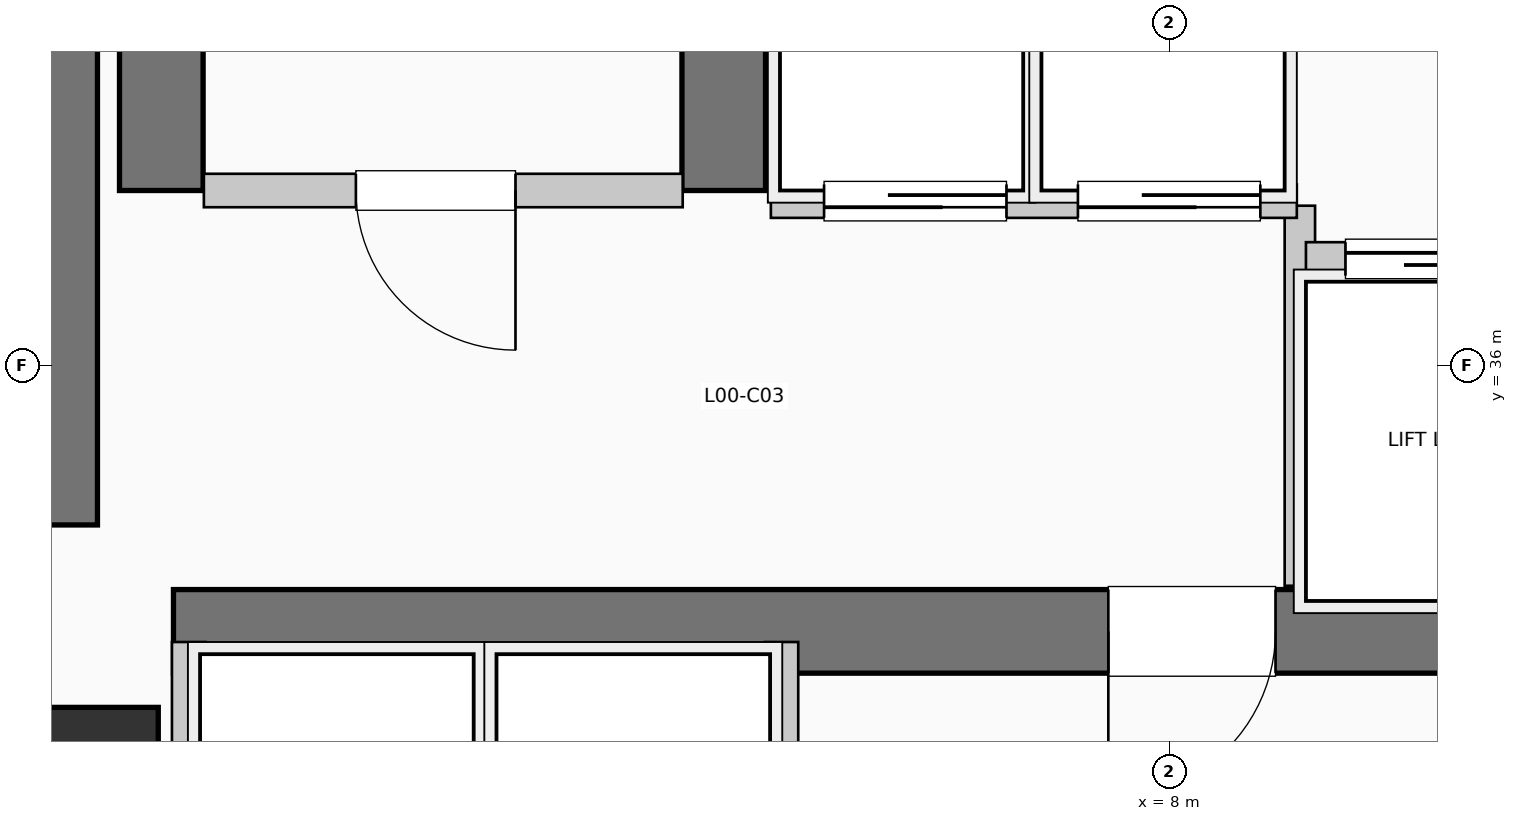
"""IFC4 building model, lengths in metres.
Left out: names, types, materials, properties, quantities, classifications, styles, units other than length and angle.
Written with IfcOpenShell. Run it as: python <this file> out.ifc"""

import sys

from ifc_helpers import new_model, si_unit, direction, frame, frame_2d, origin, origin_2d, place, context, subcontext, project, spatial, rectangle, extrude, element, fill, save


model = new_model("IFC4")
c1 = context("Model", 3, precision=1e-05, world=origin(), true_north=direction((0.0, 1.0)))
c2 = subcontext(c1, "Body", "Model", "MODEL_VIEW")
j1 = project(units=[si_unit("LENGTHUNIT", "METRE"), si_unit("PLANEANGLEUNIT", "RADIAN")], contexts=[c1])
p1 = place(None, origin())
s1 = spatial("IfcSite", under=j1, at=p1, CompositionType="ELEMENT")
p2 = place(p1, origin())
s2 = spatial("IfcBuilding", under=s1, at=p2, CompositionType="ELEMENT")
p3 = place(p2, origin())
s3 = spatial("IfcBuildingStorey", under=s2, at=p3, CompositionType="ELEMENT", Elevation=0.0)
p4 = place(p3, frame((0.5, 34.95, 0.0), z_axis=(0.0, 0.0, 1.0), x_axis=(0.0, 1.0, 0.0)))
e1 = element("IfcWall", 1, at=p4, inside=s3, PredefinedType="SHEAR", context=c2, shape_type="SweptSolid", body=[
    extrude(rectangle(XDim=7.9, YDim=0.9, at=frame_2d((3.95, 0.0))), origin(), (0.0, 0.0, 1.0), 5.94),
])
p5 = place(p3, frame((1.45, 34.25, 0.0), z_axis=(0.0, 0.0, 1.0), x_axis=(1.0, 0.0, 0.0)))
e2 = element("IfcWall", 2, at=p5, inside=s3, PredefinedType="SHEAR", context=c2, shape_type="SweptSolid", body=[
    extrude(rectangle(XDim=10.71, YDim=0.55, at=frame_2d((5.355, 0.0))), origin(), (0.0, 0.0, 1.0), 5.94),
])
p6 = place(p5, frame((7.25, 0.0, 0.0), z_axis=(0.0, 0.0, 1.0), x_axis=(-1.0, 0.0, 0.0)))
e3 = element("IfcOpeningElement", 3, at=p6, cuts=e2, PredefinedType="OPENING", context=c2, shape_type="SweptSolid", body=[
    extrude(rectangle(XDim=1.1, YDim=2.15, at=frame_2d((0.55, 1.075))), frame((0.0, 0.285, 0.0), z_axis=(0.0, -1.0, 0.0), x_axis=(1.0, 0.0, 0.0)), (0.0, 0.0, 1.0), 0.57),
])
for number, where, z_axis, x_axis in (
    (4, (1.37, 37.15, 0.0), (0.0, 0.0, 1.0), (0.0, 1.0, 0.0)),
    (5, (5.07, 37.15, 0.0), (0.0, 0.0, 1.0), (0.0, 1.0, 0.0)),
):
    element("IfcWall", number, at=place(p3, frame(where, z_axis=z_axis, x_axis=x_axis)), inside=s3, PredefinedType="SHEAR", context=c2, shape_type="SweptSolid", body=[
        extrude(rectangle(XDim=7.89, YDim=0.55, at=frame_2d((3.945, 0.0))), origin(), (0.0, 0.0, 1.0), 5.94),
    ])
p7 = place(p3, frame((0.8, 33.2, 0.0), z_axis=(0.0, 0.0, 1.0), x_axis=(1.0, 0.0, 0.0)))
e6 = element("IfcColumn", 6, at=p7, inside=s3, PredefinedType="COLUMN", context=c2, shape_type="SweptSolid", body=[
    extrude(rectangle(XDim=1.1, YDim=1.1, at=origin_2d()), origin(), (0.0, 0.0, 1.0), 5.94),
])
p8 = place(p3, frame((1.65, 37.15, 0.0), z_axis=(0.0, 0.0, 1.0), x_axis=(1.0, 0.0, 0.0)))
e7 = element("IfcWall", 7, at=p8, inside=s3, PredefinedType="PARTITIONING", context=c2, shape_type="SweptSolid", body=[
    extrude(rectangle(XDim=3.15, YDim=0.22, at=frame_2d((1.575, 0.0))), origin(), (0.0, 0.0, 1.0), 5.62),
])
p9 = place(p8, frame((2.05, 0.0, 0.0), z_axis=(0.0, 0.0, 1.0), x_axis=(-1.0, 0.0, 0.0)))
e8 = element("IfcOpeningElement", 8, at=p9, cuts=e7, PredefinedType="OPENING", context=c2, shape_type="SweptSolid", body=[
    extrude(rectangle(XDim=1.05, YDim=2.15, at=frame_2d((0.525, 1.075))), frame((0.0, 0.12, 0.0), z_axis=(0.0, -1.0, 0.0), x_axis=(1.0, 0.0, 0.0)), (0.0, 0.0, 1.0), 0.24),
])
p10 = place(p3, frame((8.86, 34.55, 0.0), z_axis=(0.0, 0.0, 1.0), x_axis=(0.0, 1.0, 0.0)))
e9 = element("IfcWall", 9, at=p10, inside=s3, PredefinedType="PARTITIONING", context=c2, shape_type="SweptSolid", body=[
    extrude(rectangle(XDim=2.5, YDim=0.2, at=frame_2d((1.25, 0.0))), origin(), (0.0, 0.0, 1.0), 5.62),
])
p11 = place(p3, frame((5.38, 37.08, 0.0), z_axis=(0.0, 0.0, 1.0), x_axis=(1.0, 0.0, 0.0)))
e10 = element("IfcWall", 10, at=p11, inside=s3, PredefinedType="PARTITIONING", context=c2, shape_type="SweptSolid", body=[
    extrude(rectangle(XDim=3.46, YDim=0.22, at=frame_2d((1.73, 0.0))), origin(), (0.0, 0.0, 1.0), 5.62),
])
p12 = place(p11, frame((1.55, 0.0, 0.0), z_axis=(0.0, 0.0, 1.0), x_axis=(-1.0, 0.0, 0.0)))
e11 = element("IfcOpeningElement", 11, at=p12, cuts=e10, PredefinedType="OPENING", context=c2, shape_type="SweptSolid", body=[
    extrude(rectangle(XDim=1.2, YDim=2.2, at=frame_2d((0.6, 1.1))), frame((0.0, 0.12, 0.0), z_axis=(0.0, -1.0, 0.0), x_axis=(1.0, 0.0, 0.0)), (0.0, 0.0, 1.0), 0.24),
])
p13 = place(p11, frame((3.22, 0.0, 0.0), z_axis=(0.0, 0.0, 1.0), x_axis=(-1.0, 0.0, 0.0)))
e12 = element("IfcOpeningElement", 12, at=p13, cuts=e10, PredefinedType="OPENING", context=c2, shape_type="SweptSolid", body=[
    extrude(rectangle(XDim=1.2, YDim=2.2, at=frame_2d((0.6, 1.1))), frame((0.0, 0.12, 0.0), z_axis=(0.0, -1.0, 0.0), x_axis=(1.0, 0.0, 0.0)), (0.0, 0.0, 1.0), 0.24),
])
for number, where, z_axis, x_axis in (
    (13, (1.55, 31.8, 0.0), (0.0, 0.0, 1.0), (0.0, 1.0, 0.0)),
    (14, (5.45, 31.8, 0.0), (0.0, 0.0, 1.0), (0.0, 1.0, 0.0)),
):
    element("IfcWall", number, at=place(p3, frame(where, z_axis=z_axis, x_axis=x_axis)), inside=s3, PredefinedType="PARTITIONING", context=c2, shape_type="SweptSolid", body=[
        extrude(rectangle(XDim=2.38, YDim=0.22, at=frame_2d((1.19, 0.0))), origin(), (0.0, 0.0, 1.0), 5.62),
    ])
p14 = place(p3, frame((8.9, 36.7, 0.0), z_axis=(0.0, 0.0, 1.0), x_axis=(1.0, 0.0, 0.0)))
e15 = element("IfcWall", 15, at=p14, inside=s3, PredefinedType="PARTITIONING", context=c2, shape_type="SweptSolid", body=[
    extrude(rectangle(XDim=3.26, YDim=0.22, at=frame_2d((1.63, 0.0))), origin(), (0.0, 0.0, 1.0), 5.62),
])
p15 = place(p14, frame((0.26, 0.0, 0.0)))
e16 = element("IfcOpeningElement", 16, at=p15, cuts=e15, PredefinedType="OPENING", context=c2, shape_type="SweptSolid", body=[
    extrude(rectangle(XDim=1.1, YDim=2.2, at=frame_2d((0.55, 1.1))), frame((0.0, 0.12, 0.0), z_axis=(0.0, -1.0, 0.0), x_axis=(1.0, 0.0, 0.0)), (0.0, 0.0, 1.0), 0.24),
])
p16 = place(p14, frame((1.88, 0.0, 0.0)))
e17 = element("IfcOpeningElement", 17, at=p16, cuts=e15, PredefinedType="OPENING", context=c2, shape_type="SweptSolid", body=[
    extrude(rectangle(XDim=1.1, YDim=2.2, at=frame_2d((0.55, 1.1))), frame((0.0, 0.12, 0.0), z_axis=(0.0, -1.0, 0.0), x_axis=(1.0, 0.0, 0.0)), (0.0, 0.0, 1.0), 0.24),
])
p17 = place(p9, origin())
e18 = element("IfcDoor", 18, at=p17, inside=s3, OperationType="SINGLE_SWING_RIGHT", PredefinedType="DOOR", context=c2, shape_type="SweptSolid", body=[
    extrude(rectangle(XDim=1.05, YDim=2.15, at=frame_2d((0.525, 1.075))), frame((0.0, 0.025, 0.0), z_axis=(0.0, -1.0, 0.0), x_axis=(1.0, 0.0, 0.0)), (0.0, 0.0, 1.0), 0.05),
])
fill(e8, e18)
p18 = place(p6, origin())
e19 = element("IfcDoor", 19, at=p18, inside=s3, OperationType="SINGLE_SWING_LEFT", PredefinedType="DOOR", context=c2, shape_type="SweptSolid", body=[
    extrude(rectangle(XDim=1.1, YDim=2.15, at=frame_2d((0.55, 1.075))), frame((0.0, 0.025, 0.0), z_axis=(0.0, -1.0, 0.0), x_axis=(1.0, 0.0, 0.0)), (0.0, 0.0, 1.0), 0.05),
])
fill(e3, e19)
p19 = place(p12, origin())
e20 = element("IfcDoor", 20, at=p19, inside=s3, OperationType="SLIDING_TO_RIGHT", PredefinedType="DOOR", context=c2, shape_type="SweptSolid", body=[
    extrude(rectangle(XDim=1.2, YDim=2.2, at=frame_2d((0.6, 1.1))), frame((0.0, 0.025, 0.0), z_axis=(0.0, -1.0, 0.0), x_axis=(1.0, 0.0, 0.0)), (0.0, 0.0, 1.0), 0.05),
])
fill(e11, e20)
p20 = place(p13, origin())
e21 = element("IfcDoor", 21, at=p20, inside=s3, OperationType="SLIDING_TO_RIGHT", PredefinedType="DOOR", context=c2, shape_type="SweptSolid", body=[
    extrude(rectangle(XDim=1.2, YDim=2.2, at=frame_2d((0.6, 1.1))), frame((0.0, 0.025, 0.0), z_axis=(0.0, -1.0, 0.0), x_axis=(1.0, 0.0, 0.0)), (0.0, 0.0, 1.0), 0.05),
])
fill(e12, e21)
p21 = place(p15, origin())
e22 = element("IfcDoor", 22, at=p21, inside=s3, OperationType="SLIDING_TO_LEFT", PredefinedType="DOOR", context=c2, shape_type="SweptSolid", body=[
    extrude(rectangle(XDim=1.1, YDim=2.2, at=frame_2d((0.55, 1.1))), frame((0.0, 0.025, 0.0), z_axis=(0.0, -1.0, 0.0), x_axis=(1.0, 0.0, 0.0)), (0.0, 0.0, 1.0), 0.05),
])
fill(e16, e22)
save(model, sys.argv[1])
